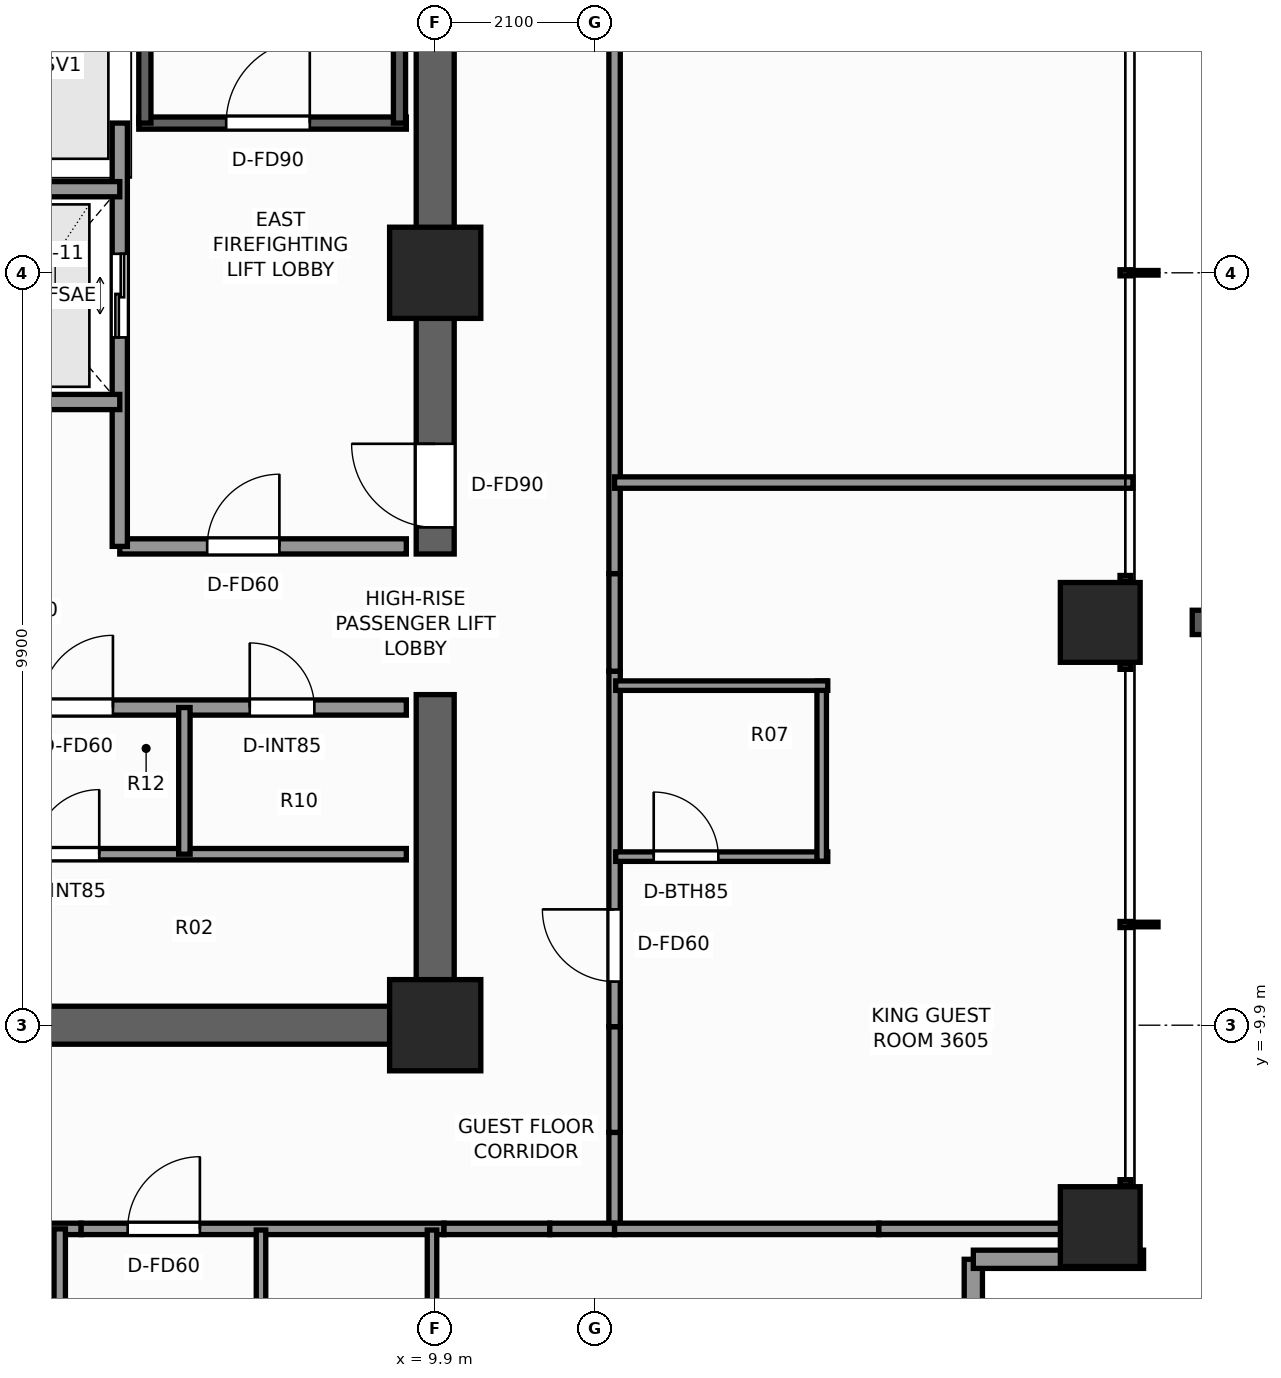
"""IFC4 building model, lengths in metres.
Left out: names, types, materials, properties, quantities, classifications, styles, units other than length and angle.
Written with IfcOpenShell. Run it as: python <this file> out.ifc"""

import sys

from ifc_helpers import new_model, si_unit, direction, frame, frame_2d, origin, origin_2d, place, context, subcontext, project, spatial, rectangle, extrude, element, fill, save


model = new_model("IFC4")
c1 = context("Model", 3, precision=1e-05, world=origin(), true_north=direction((0.0, 1.0)))
c2 = subcontext(c1, "Body", "Model", "MODEL_VIEW")
j1 = project(units=[si_unit("LENGTHUNIT", "METRE"), si_unit("PLANEANGLEUNIT", "RADIAN")], contexts=[c1])
p1 = place(None, origin())
s1 = spatial("IfcSite", under=j1, at=p1, CompositionType="ELEMENT")
p2 = place(p1, origin())
s2 = spatial("IfcBuilding", under=s1, at=p2, CompositionType="ELEMENT")
p3 = place(p2, frame((0.0, 0.0, 125.0)))
s3 = spatial("IfcBuildingStorey", under=s2, at=p3, CompositionType="ELEMENT", Elevation=125.0)
p4 = place(p3, frame((10.15, -9.9, 0.0), z_axis=(0.0, 0.0, 1.0), x_axis=(-1.0, 0.0, 0.0)))
e1 = element("IfcWall", 1, at=p4, inside=s3, PredefinedType="SHEAR", context=c2, shape_type="SweptSolid", body=[
    extrude(rectangle(XDim=12.01, YDim=0.5, at=frame_2d((6.005, 0.0))), origin(), (0.0, 0.0, 1.0), 3.3),
])
p5 = place(p3, frame((9.9, -9.65, 0.0), z_axis=(0.0, 0.0, 1.0), x_axis=(0.0, 1.0, 0.0)))
e2 = element("IfcWall", 2, at=p5, inside=s3, PredefinedType="SHEAR", context=c2, shape_type="SweptSolid", body=[
    extrude(rectangle(XDim=4.1, YDim=0.5, at=frame_2d((2.05, 0.0))), origin(), (0.0, 0.0, 1.0), 3.3),
])
p6 = place(p3, frame((9.9, -3.7, 0.0), z_axis=(0.0, 0.0, 1.0), x_axis=(0.0, 1.0, 0.0)))
e3 = element("IfcWall", 3, at=p6, inside=s3, PredefinedType="SHEAR", context=c2, shape_type="SweptSolid", body=[
    extrude(rectangle(XDim=13.35, YDim=0.5, at=frame_2d((6.675, 0.0))), origin(), (0.0, 0.0, 1.0), 3.3),
])
p7 = place(p6, frame((0.35, 0.0, 0.0)))
e4 = element("IfcOpeningElement", 4, at=p7, cuts=e3, PredefinedType="OPENING", context=c2, shape_type="SweptSolid", body=[
    extrude(rectangle(XDim=1.1, YDim=2.2, at=frame_2d((0.55, 1.1))), frame((0.0, 0.26, 0.0), z_axis=(0.0, -1.0, 0.0), x_axis=(1.0, 0.0, 0.0)), (0.0, 0.0, 1.0), 0.52),
])
for number, where, z_axis, x_axis in (
    (5, (9.9, -9.9, 0.0), (0.0, 0.0, 1.0), (1.0, 0.0, 0.0)),
    (6, (9.9, 0.0, 0.0), (0.0, 0.0, 1.0), (1.0, 0.0, 0.0)),
):
    element("IfcColumn", number, at=place(p3, frame(where, z_axis=z_axis, x_axis=x_axis)), inside=s3, PredefinedType="COLUMN", context=c2, shape_type="SweptSolid", body=[
        extrude(rectangle(XDim=1.2, YDim=1.2, at=origin_2d()), origin(), (0.0, 0.0, 1.0), 3.3),
    ])
for number, where, z_axis, x_axis in (
    (7, (18.65, -12.55, 0.0), (0.0, 0.0, 1.0), (1.0, 0.0, 0.0)),
    (8, (18.65, -4.6, 0.0), (0.0, 0.0, 1.0), (1.0, 0.0, 0.0)),
):
    element("IfcColumn", number, at=place(p3, frame(where, z_axis=z_axis, x_axis=x_axis)), inside=s3, PredefinedType="COLUMN", context=c2, shape_type="SweptSolid", body=[
        extrude(rectangle(XDim=1.05, YDim=1.05, at=origin_2d()), origin(), (0.0, 0.0, 1.0), 3.3),
    ])
for number, where, z_axis, x_axis in (
    (9, (16.98, -12.98, 0.0), (0.0, 0.0, 1.0), (0.0, -1.0, 0.0)),
    (10, (19.22, -12.98, 0.0), (0.0, 0.0, 1.0), (-1.0, 0.0, 0.0)),
):
    element("IfcWall", number, at=place(p3, frame(where, z_axis=z_axis, x_axis=x_axis)), inside=s3, PredefinedType="STANDARD", context=c2, shape_type="SweptSolid", body=[
        extrude(rectangle(XDim=2.24, YDim=0.24, at=frame_2d((1.12, 0.0))), origin(), (0.0, 0.0, 1.0), 1.295),
    ])
p8 = place(p3, frame((6.0, 1.97, 0.0), z_axis=(0.0, 0.0, 1.0), x_axis=(1.0, 0.0, 0.0)))
e11 = element("IfcWall", 11, at=p8, inside=s3, PredefinedType="SHEAR", context=c2, shape_type="SweptSolid", body=[
    extrude(rectangle(XDim=3.52, YDim=0.16, at=frame_2d((1.76, 0.0))), origin(), (0.0, 0.0, 1.0), 3.3),
])
p9 = place(p8, frame((1.15, 0.0, 0.0)))
e12 = element("IfcOpeningElement", 12, at=p9, cuts=e11, PredefinedType="OPENING", context=c2, shape_type="SweptSolid", body=[
    extrude(rectangle(XDim=1.1, YDim=2.2, at=frame_2d((0.55, 1.1))), frame((0.0, 0.09, 0.0), z_axis=(0.0, -1.0, 0.0), x_axis=(1.0, 0.0, 0.0)), (0.0, 0.0, 1.0), 0.18),
])
for number, where, z_axis, x_axis in (
    (13, (6.08, 1.97, 0.0), (0.0, 0.0, 1.0), (0.0, 1.0, 0.0)),
    (14, (9.43, 1.97, 0.0), (0.0, 0.0, 1.0), (0.0, 1.0, 0.0)),
):
    element("IfcWall", number, at=place(p3, frame(where, z_axis=z_axis, x_axis=x_axis)), inside=s3, PredefinedType="SHEAR", context=c2, shape_type="SweptSolid", body=[
        extrude(rectangle(XDim=7.56, YDim=0.16, at=frame_2d((3.78, 0.0))), origin(), (0.0, 0.0, 1.0), 3.3),
    ])
p10 = place(p3, frame((5.75, -3.6, 0.0), z_axis=(0.0, 0.0, 1.0), x_axis=(1.0, 0.0, 0.0)))
e15 = element("IfcWall", 15, at=p10, inside=s3, PredefinedType="SOLIDWALL", context=c2, shape_type="SweptSolid", body=[
    extrude(rectangle(XDim=3.77, YDim=0.2, at=frame_2d((1.885, 0.0))), origin(), (0.0, 0.0, 1.0), 3.1),
])
p11 = place(p10, frame((1.15, 0.0, 0.0)))
e16 = element("IfcOpeningElement", 16, at=p11, cuts=e15, PredefinedType="OPENING", context=c2, shape_type="SweptSolid", body=[
    extrude(rectangle(XDim=0.95, YDim=2.06, at=frame_2d((0.475, 1.03))), frame((0.0, 0.11, 0.0), z_axis=(0.0, -1.0, 0.0), x_axis=(1.0, 0.0, 0.0)), (0.0, 0.0, 1.0), 0.22),
])
p12 = place(p3, frame((5.75, -3.6, 0.0), z_axis=(0.0, 0.0, 1.0), x_axis=(0.0, 1.0, 0.0)))
e17 = element("IfcWall", 17, at=p12, inside=s3, PredefinedType="SOLIDWALL", context=c2, shape_type="SweptSolid", body=[
    extrude(rectangle(XDim=5.57, YDim=0.2, at=frame_2d((2.785, 0.0))), origin(), (0.0, 0.0, 1.0), 2.735),
])
p13 = place(p12, frame((2.75, 0.0, 0.0)))
e18 = element("IfcOpeningElement", 18, at=p13, cuts=e17, PredefinedType="OPENING", context=c2, shape_type="SweptSolid", body=[
    extrude(rectangle(XDim=1.1, YDim=2.2, at=frame_2d((0.55, 1.1))), frame((0.0, 0.11, 0.0), z_axis=(0.0, -1.0, 0.0), x_axis=(1.0, 0.0, 0.0)), (0.0, 0.0, 1.0), 0.22),
])
for number, where, z_axis, x_axis in (
    (19, (3.35, -1.7, 0.0), (0.0, 0.0, 1.0), (1.0, 0.0, 0.0)),
    (20, (3.35, 1.1, 0.0), (0.0, 0.0, 1.0), (1.0, 0.0, 0.0)),
):
    element("IfcWall", number, at=place(p3, frame(where, z_axis=z_axis, x_axis=x_axis)), inside=s3, PredefinedType="SOLIDWALL", context=c2, shape_type="SweptSolid", body=[
        extrude(rectangle(XDim=2.4, YDim=0.2, at=frame_2d((1.2, 0.0))), origin(), (0.0, 0.0, 1.0), 3.1),
    ])
p14 = place(p3, frame((3.86, -5.72, 0.0), z_axis=(0.0, 0.0, 1.0), x_axis=(1.0, 0.0, 0.0)))
e21 = element("IfcWall", 21, at=p14, inside=s3, PredefinedType="SOLIDWALL", context=c2, shape_type="SweptSolid", body=[
    extrude(rectangle(XDim=5.66, YDim=0.2, at=frame_2d((2.83, 0.0))), origin(), (0.0, 0.0, 1.0), 3.1),
])
p15 = place(p14, frame((0.85, 0.0, 0.0)))
e22 = element("IfcOpeningElement", 22, at=p15, cuts=e21, PredefinedType="OPENING", context=c2, shape_type="SweptSolid", body=[
    extrude(rectangle(XDim=0.95, YDim=2.06, at=frame_2d((0.475, 1.03))), frame((0.0, 0.11, 0.0), z_axis=(0.0, -1.0, 0.0), x_axis=(1.0, 0.0, 0.0)), (0.0, 0.0, 1.0), 0.22),
])
p16 = place(p14, frame((3.6, 0.0, 0.0)))
e23 = element("IfcOpeningElement", 23, at=p16, cuts=e21, PredefinedType="OPENING", context=c2, shape_type="SweptSolid", body=[
    extrude(rectangle(XDim=0.85, YDim=2.03, at=frame_2d((0.425, 1.015))), frame((0.0, 0.11, 0.0), z_axis=(0.0, -1.0, 0.0), x_axis=(1.0, 0.0, 0.0)), (0.0, 0.0, 1.0), 0.22),
])
p17 = place(p3, frame((3.68, -7.65, 0.0), z_axis=(0.0, 0.0, 1.0), x_axis=(1.0, 0.0, 0.0)))
e24 = element("IfcWall", 24, at=p17, inside=s3, PredefinedType="PARTITIONING", context=c2, shape_type="SweptSolid", body=[
    extrude(rectangle(XDim=5.84, YDim=0.15, at=frame_2d((2.92, 0.0))), origin(), (0.0, 0.0, 1.0), 3.1),
])
p18 = place(p17, frame((0.95, 0.0, 0.0)))
e25 = element("IfcOpeningElement", 25, at=p18, cuts=e24, PredefinedType="OPENING", context=c2, shape_type="SweptSolid", body=[
    extrude(rectangle(XDim=0.85, YDim=2.03, at=frame_2d((0.425, 1.015))), frame((0.0, 0.085, 0.0), z_axis=(0.0, -1.0, 0.0), x_axis=(1.0, 0.0, 0.0)), (0.0, 0.0, 1.0), 0.17),
])
p19 = place(p3, frame((6.6, -7.65, 0.0), z_axis=(0.0, 0.0, 1.0), x_axis=(0.0, 1.0, 0.0)))
e26 = element("IfcWall", 26, at=p19, inside=s3, PredefinedType="PARTITIONING", context=c2, shape_type="SweptSolid", body=[
    extrude(rectangle(XDim=1.93, YDim=0.15, at=frame_2d((0.965, 0.0))), origin(), (0.0, 0.0, 1.0), 3.1),
])
p20 = place(p3, frame((12.26, -12.58, 0.0), z_axis=(0.0, 0.0, 1.0), x_axis=(0.0, 1.0, 0.0)))
e27 = element("IfcWall", 27, at=p20, inside=s3, PredefinedType="PARTITIONING", context=c2, shape_type="SweptSolid", body=[
    extrude(rectangle(XDim=1.27, YDim=0.15, at=frame_2d((0.635, 0.0))), origin(), (0.0, 0.0, 1.0), 3.1),
])
p21 = place(p3, frame((12.26, -11.311, 0.0), z_axis=(0.0, 0.0, 1.0), x_axis=(0.0, 1.0, 0.0)))
e28 = element("IfcWall", 28, at=p21, inside=s3, PredefinedType="PARTITIONING", context=c2, shape_type="SweptSolid", body=[
    extrude(rectangle(XDim=1.392, YDim=0.15, at=frame_2d((0.696, 0.0))), origin(), (0.0, 0.0, 1.0), 1.285),
])
p22 = place(p3, frame((12.26, -9.919, 0.0), z_axis=(0.0, 0.0, 1.0), x_axis=(0.0, 1.0, 0.0)))
e29 = element("IfcWall", 29, at=p22, inside=s3, PredefinedType="PARTITIONING", context=c2, shape_type="SweptSolid", body=[
    extrude(rectangle(XDim=4.677, YDim=0.15, at=frame_2d((2.338, 0.0))), origin(), (0.0, 0.0, 1.0), 3.1),
])
p23 = place(p22, frame((0.593, 0.0, 0.0)))
e30 = element("IfcOpeningElement", 30, at=p23, cuts=e29, PredefinedType="OPENING", context=c2, shape_type="SweptSolid", body=[
    extrude(rectangle(XDim=0.95, YDim=2.06, at=frame_2d((0.475, 1.03))), frame((0.0, 0.085, 0.0), z_axis=(0.0, -1.0, 0.0), x_axis=(1.0, 0.0, 0.0)), (0.0, 0.0, 1.0), 0.17),
])
p24 = place(p3, frame((12.26, -5.242, 0.0), z_axis=(0.0, 0.0, 1.0), x_axis=(0.0, 1.0, 0.0)))
e31 = element("IfcWall", 31, at=p24, inside=s3, PredefinedType="PARTITIONING", context=c2, shape_type="SweptSolid", body=[
    extrude(rectangle(XDim=1.284, YDim=0.15, at=frame_2d((0.642, 0.0))), origin(), (0.0, 0.0, 1.0), 1.285),
])
p25 = place(p3, frame((12.26, -3.958, 0.0), z_axis=(0.0, 0.0, 1.0), x_axis=(0.0, 1.0, 0.0)))
e32 = element("IfcWall", 32, at=p25, inside=s3, PredefinedType="PARTITIONING", context=c2, shape_type="SweptSolid", body=[
    extrude(rectangle(XDim=7.916, YDim=0.15, at=frame_2d((3.958, 0.0))), origin(), (0.0, 0.0, 1.0), 2.389),
])
p26 = place(p3, frame((3.958, -12.58, 0.0), z_axis=(0.0, 0.0, 1.0), x_axis=(1.0, 0.0, 0.0)))
e33 = element("IfcWall", 33, at=p26, inside=s3, PredefinedType="PARTITIONING", context=c2, shape_type="SweptSolid", body=[
    extrude(rectangle(XDim=1.284, YDim=0.15, at=frame_2d((0.642, 0.0))), origin(), (0.0, 0.0, 1.0), 1.285),
])
p27 = place(p3, frame((5.242, -12.58, 0.0), z_axis=(0.0, 0.0, 1.0), x_axis=(1.0, 0.0, 0.0)))
e34 = element("IfcWall", 34, at=p27, inside=s3, PredefinedType="PARTITIONING", context=c2, shape_type="SweptSolid", body=[
    extrude(rectangle(XDim=4.774, YDim=0.15, at=frame_2d((2.387, 0.0))), origin(), (0.0, 0.0, 1.0), 3.1),
])
p28 = place(p27, frame((0.612, 0.0, 0.0)))
e35 = element("IfcOpeningElement", 35, at=p28, cuts=e34, PredefinedType="OPENING", context=c2, shape_type="SweptSolid", body=[
    extrude(rectangle(XDim=0.95, YDim=2.06, at=frame_2d((0.475, 1.03))), frame((0.0, 0.085, 0.0), z_axis=(0.0, -1.0, 0.0), x_axis=(1.0, 0.0, 0.0)), (0.0, 0.0, 1.0), 0.17),
])
p29 = place(p3, frame((10.016, -12.58, 0.0), z_axis=(0.0, 0.0, 1.0), x_axis=(1.0, 0.0, 0.0)))
e36 = element("IfcWall", 36, at=p29, inside=s3, PredefinedType="PARTITIONING", context=c2, shape_type="SweptSolid", body=[
    extrude(rectangle(XDim=1.392, YDim=0.15, at=frame_2d((0.696, 0.0))), origin(), (0.0, 0.0, 1.0), 1.285),
])
p30 = place(p3, frame((11.407, -12.58, 0.0), z_axis=(0.0, 0.0, 1.0), x_axis=(1.0, 0.0, 0.0)))
e37 = element("IfcWall", 37, at=p30, inside=s3, PredefinedType="PARTITIONING", context=c2, shape_type="SweptSolid", body=[
    extrude(rectangle(XDim=0.853, YDim=0.15, at=frame_2d((0.426, 0.0))), origin(), (0.0, 0.0, 1.0), 3.1),
])
p31 = place(p3, frame((12.26, -12.58, 0.0), z_axis=(0.0, 0.0, 1.0), x_axis=(1.0, 0.0, 0.0)))
e38 = element("IfcWall", 38, at=p31, inside=s3, PredefinedType="PARTITIONING", context=c2, shape_type="SweptSolid", body=[
    extrude(rectangle(XDim=3.478, YDim=0.15, at=frame_2d((1.739, 0.0))), origin(), (0.0, 0.0, 1.0), 3.1),
])
p32 = place(p3, frame((15.738, -12.58, 0.0), z_axis=(0.0, 0.0, 1.0), x_axis=(1.0, 0.0, 0.0)))
e39 = element("IfcWall", 39, at=p32, inside=s3, PredefinedType="PARTITIONING", context=c2, shape_type="SweptSolid", body=[
    extrude(rectangle(XDim=2.74, YDim=0.15, at=frame_2d((1.37, 0.0))), origin(), (0.0, 0.0, 1.0), 1.285),
])
p33 = place(p3, frame((18.478, -12.58, 0.0), z_axis=(0.0, 0.0, 1.0), x_axis=(1.0, 0.0, 0.0)))
e40 = element("IfcWall", 40, at=p33, inside=s3, PredefinedType="PARTITIONING", context=c2, shape_type="SweptSolid", body=[
    extrude(rectangle(XDim=0.602, YDim=0.15, at=frame_2d((0.301, 0.0))), origin(), (0.0, 0.0, 1.0), 3.1),
])
p34 = place(p3, frame((12.26, -2.76, 0.0), z_axis=(0.0, 0.0, 1.0), x_axis=(1.0, 0.0, 0.0)))
e41 = element("IfcWall", 41, at=p34, inside=s3, PredefinedType="PARTITIONING", context=c2, shape_type="SweptSolid", body=[
    extrude(rectangle(XDim=6.82, YDim=0.15, at=frame_2d((3.41, 0.0))), origin(), (0.0, 0.0, 1.0), 2.469),
])
p35 = place(p3, frame((12.275, -7.682, 0.0), z_axis=(0.0, 0.0, 1.0), x_axis=(1.0, 0.0, 0.0)))
e42 = element("IfcWall", 42, at=p35, inside=s3, PredefinedType="PARTITIONING", context=c2, shape_type="SweptSolid", body=[
    extrude(rectangle(XDim=2.79, YDim=0.125, at=frame_2d((1.395, 0.0))), origin(), (0.0, 0.0, 1.0), 3.1),
])
p36 = place(p35, frame((0.5, 0.0, 0.0)))
e43 = element("IfcOpeningElement", 43, at=p36, cuts=e42, PredefinedType="OPENING", context=c2, shape_type="SweptSolid", body=[
    extrude(rectangle(XDim=0.85, YDim=2.03, at=frame_2d((0.425, 1.015))), frame((0.0, 0.073, 0.0), z_axis=(0.0, -1.0, 0.0), x_axis=(1.0, 0.0, 0.0)), (0.0, 0.0, 1.0), 0.145),
])
p37 = place(p3, frame((14.985, -7.742, 0.0), z_axis=(0.0, 0.0, 1.0), x_axis=(0.0, 1.0, 0.0)))
e44 = element("IfcWall", 44, at=p37, inside=s3, PredefinedType="PARTITIONING", context=c2, shape_type="SweptSolid", body=[
    extrude(rectangle(XDim=2.37, YDim=0.125, at=frame_2d((1.185, 0.0))), origin(), (0.0, 0.0, 1.0), 3.1),
])
p38 = place(p3, frame((12.275, -5.432, 0.0), z_axis=(0.0, 0.0, 1.0), x_axis=(1.0, 0.0, 0.0)))
e45 = element("IfcWall", 45, at=p38, inside=s3, PredefinedType="PARTITIONING", context=c2, shape_type="SweptSolid", body=[
    extrude(rectangle(XDim=2.79, YDim=0.125, at=frame_2d((1.395, 0.0))), origin(), (0.0, 0.0, 1.0), 3.1),
])
p39 = place(p3, frame((4.96, -18.444, 0.0), z_axis=(0.0, 0.0, 1.0), x_axis=(0.0, 1.0, 0.0)))
e46 = element("IfcWall", 46, at=p39, inside=s3, PredefinedType="PARTITIONING", context=c2, shape_type="SweptSolid", body=[
    extrude(rectangle(XDim=5.864, YDim=0.15, at=frame_2d((2.932, 0.0))), origin(), (0.0, 0.0, 1.0), 1.285),
])
p40 = place(p3, frame((7.608, -15.385, 0.0), z_axis=(0.0, 0.0, 1.0), x_axis=(0.0, 1.0, 0.0)))
e47 = element("IfcWall", 47, at=p40, inside=s3, PredefinedType="PARTITIONING", context=c2, shape_type="SweptSolid", body=[
    extrude(rectangle(XDim=2.79, YDim=0.125, at=frame_2d((1.395, 0.0))), origin(), (0.0, 0.0, 1.0), 3.1),
])
p41 = place(p40, frame((0.5, 0.0, 0.0)))
e48 = element("IfcOpeningElement", 48, at=p41, cuts=e47, PredefinedType="OPENING", context=c2, shape_type="SweptSolid", body=[
    extrude(rectangle(XDim=0.85, YDim=2.03, at=frame_2d((0.425, 1.015))), frame((0.0, 0.073, 0.0), z_axis=(0.0, -1.0, 0.0), x_axis=(1.0, 0.0, 0.0)), (0.0, 0.0, 1.0), 0.145),
])
p42 = place(p3, frame((9.858, -15.385, 0.0), z_axis=(0.0, 0.0, 1.0), x_axis=(0.0, 1.0, 0.0)))
e49 = element("IfcWall", 49, at=p42, inside=s3, PredefinedType="PARTITIONING", context=c2, shape_type="SweptSolid", body=[
    extrude(rectangle(XDim=2.79, YDim=0.125, at=frame_2d((1.395, 0.0))), origin(), (0.0, 0.0, 1.0), 3.1),
])
p43 = place(p9, origin())
e50 = element("IfcDoor", 50, at=p43, inside=s3, OperationType="SINGLE_SWING_RIGHT", PredefinedType="DOOR", context=c2, shape_type="SweptSolid", body=[
    extrude(rectangle(XDim=1.1, YDim=2.2, at=frame_2d((0.55, 1.1))), frame((0.0, 0.025, 0.0), z_axis=(0.0, -1.0, 0.0), x_axis=(1.0, 0.0, 0.0)), (0.0, 0.0, 1.0), 0.05),
])
fill(e12, e50)
p44 = place(p7, origin())
e51 = element("IfcDoor", 51, at=p44, inside=s3, OperationType="SINGLE_SWING_RIGHT", PredefinedType="DOOR", context=c2, shape_type="SweptSolid", body=[
    extrude(rectangle(XDim=1.1, YDim=2.2, at=frame_2d((0.55, 1.1))), frame((0.0, 0.025, 0.0), z_axis=(0.0, -1.0, 0.0), x_axis=(1.0, 0.0, 0.0)), (0.0, 0.0, 1.0), 0.05),
])
fill(e4, e51)
p45 = place(p13, origin())
e52 = element("IfcDoor", 52, at=p45, inside=s3, OperationType="DOUBLE_DOOR_SLIDING", PredefinedType="DOOR", context=c2, shape_type="SweptSolid", body=[
    extrude(rectangle(XDim=1.1, YDim=2.2, at=frame_2d((0.55, 1.1))), frame((0.0, 0.025, 0.0), z_axis=(0.0, -1.0, 0.0), x_axis=(1.0, 0.0, 0.0)), (0.0, 0.0, 1.0), 0.05),
])
fill(e18, e52)
p46 = place(p15, origin())
e53 = element("IfcDoor", 53, at=p46, inside=s3, OperationType="SINGLE_SWING_RIGHT", PredefinedType="DOOR", context=c2, shape_type="SweptSolid", body=[
    extrude(rectangle(XDim=0.95, YDim=2.06, at=frame_2d((0.475, 1.03))), frame((0.0, 0.025, 0.0), z_axis=(0.0, -1.0, 0.0), x_axis=(1.0, 0.0, 0.0)), (0.0, 0.0, 1.0), 0.05),
])
fill(e22, e53)
p47 = place(p16, origin())
e54 = element("IfcDoor", 54, at=p47, inside=s3, OperationType="SINGLE_SWING_LEFT", PredefinedType="DOOR", context=c2, shape_type="SweptSolid", body=[
    extrude(rectangle(XDim=0.85, YDim=2.03, at=frame_2d((0.425, 1.015))), frame((0.0, 0.025, 0.0), z_axis=(0.0, -1.0, 0.0), x_axis=(1.0, 0.0, 0.0)), (0.0, 0.0, 1.0), 0.05),
])
fill(e23, e54)
p48 = place(p18, origin())
e55 = element("IfcDoor", 55, at=p48, inside=s3, OperationType="SINGLE_SWING_RIGHT", PredefinedType="DOOR", context=c2, shape_type="SweptSolid", body=[
    extrude(rectangle(XDim=0.85, YDim=2.03, at=frame_2d((0.425, 1.015))), frame((0.0, 0.025, 0.0), z_axis=(0.0, -1.0, 0.0), x_axis=(1.0, 0.0, 0.0)), (0.0, 0.0, 1.0), 0.05),
])
fill(e25, e55)
p49 = place(p11, origin())
e56 = element("IfcDoor", 56, at=p49, inside=s3, OperationType="SINGLE_SWING_RIGHT", PredefinedType="DOOR", context=c2, shape_type="SweptSolid", body=[
    extrude(rectangle(XDim=0.95, YDim=2.06, at=frame_2d((0.475, 1.03))), frame((0.0, 0.025, 0.0), z_axis=(0.0, -1.0, 0.0), x_axis=(1.0, 0.0, 0.0)), (0.0, 0.0, 1.0), 0.05),
])
fill(e16, e56)
p50 = place(p36, origin())
e57 = element("IfcDoor", 57, at=p50, inside=s3, OperationType="SINGLE_SWING_LEFT", PredefinedType="DOOR", context=c2, shape_type="SweptSolid", body=[
    extrude(rectangle(XDim=0.85, YDim=2.03, at=frame_2d((0.425, 1.015))), frame((0.0, 0.025, 0.0), z_axis=(0.0, -1.0, 0.0), x_axis=(1.0, 0.0, 0.0)), (0.0, 0.0, 1.0), 0.05),
])
fill(e43, e57)
p51 = place(p23, origin())
e58 = element("IfcDoor", 58, at=p51, inside=s3, OperationType="SINGLE_SWING_RIGHT", PredefinedType="DOOR", context=c2, shape_type="SweptSolid", body=[
    extrude(rectangle(XDim=0.95, YDim=2.06, at=frame_2d((0.475, 1.03))), frame((0.0, 0.025, 0.0), z_axis=(0.0, -1.0, 0.0), x_axis=(1.0, 0.0, 0.0)), (0.0, 0.0, 1.0), 0.05),
])
fill(e30, e58)
p52 = place(p28, origin())
e59 = element("IfcDoor", 59, at=p52, inside=s3, OperationType="SINGLE_SWING_RIGHT", PredefinedType="DOOR", context=c2, shape_type="SweptSolid", body=[
    extrude(rectangle(XDim=0.95, YDim=2.06, at=frame_2d((0.475, 1.03))), frame((0.0, 0.025, 0.0), z_axis=(0.0, -1.0, 0.0), x_axis=(1.0, 0.0, 0.0)), (0.0, 0.0, 1.0), 0.05),
])
fill(e35, e59)
save(model, sys.argv[1])
